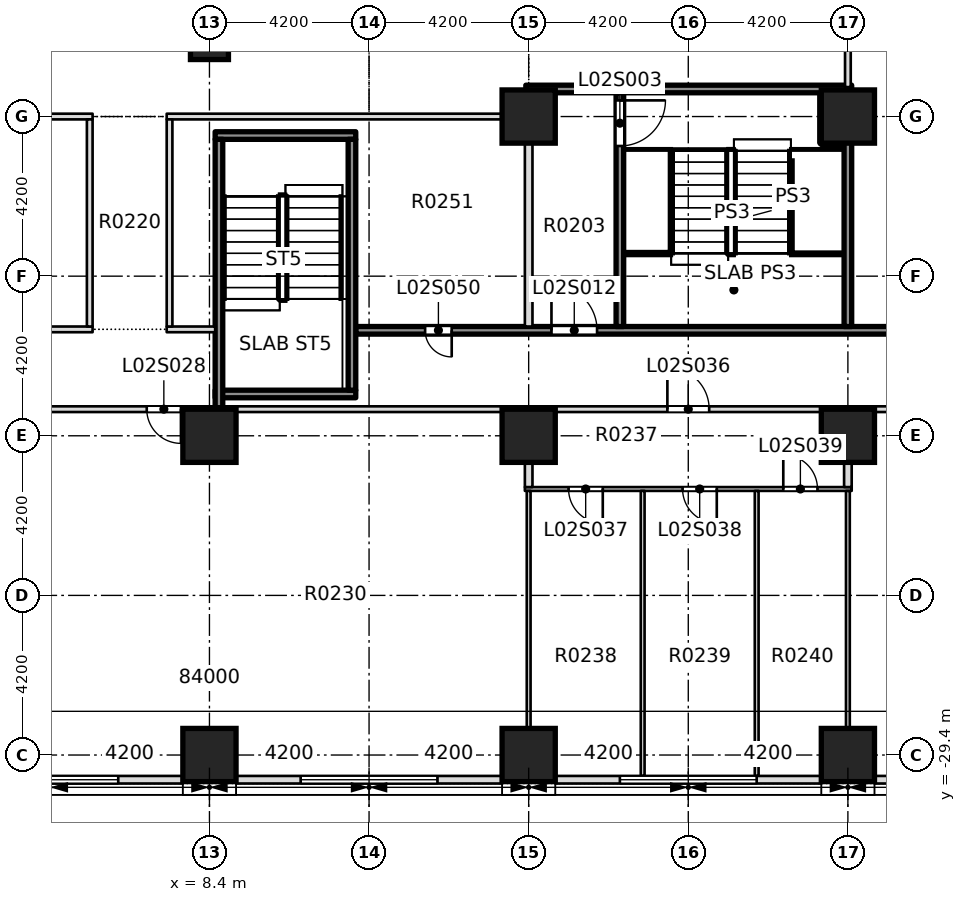
"""IFC4 building model, lengths in metres.
Left out: names, types, materials, properties, quantities, classifications, styles, units other than length and angle.
Written with IfcOpenShell. Run it as: python <this file> out.ifc"""

import sys

from ifc_helpers import new_model, si_unit, direction, frame, frame_2d, origin, origin_2d, place, context, subcontext, project, spatial, rectangle, extrude, element, fill, save


model = new_model("IFC4")
c1 = context("Model", 3, precision=1e-05, world=origin(), true_north=direction((0.0, 1.0)))
c2 = subcontext(c1, "Body", "Model", "MODEL_VIEW")
j1 = project(units=[si_unit("LENGTHUNIT", "METRE"), si_unit("PLANEANGLEUNIT", "RADIAN")], contexts=[c1])
p1 = place(None, origin())
s1 = spatial("IfcSite", under=j1, at=p1, CompositionType="ELEMENT")
p2 = place(p1, origin())
s2 = spatial("IfcBuilding", under=s1, at=p2, CompositionType="ELEMENT")
p3 = place(p2, frame((0.0, 0.0, 12.5)))
s3 = spatial("IfcBuildingStorey", under=s2, at=p3, CompositionType="ELEMENT", Elevation=12.5)
for number, where, z_axis, x_axis in (
    (1, (8.4, -21.0, -0.4), (0.0, 0.0, 1.0), (1.0, 0.0, 0.0)),
    (2, (16.8, -21.0, -0.4), (0.0, 0.0, 1.0), (1.0, 0.0, 0.0)),
    (3, (16.8, -12.6, -0.4), (0.0, 0.0, 1.0), (1.0, 0.0, 0.0)),
    (4, (25.2, -12.6, -0.4), (0.0, 0.0, 1.0), (1.0, 0.0, 0.0)),
):
    element("IfcColumn", number, at=place(p3, frame(where, z_axis=z_axis, x_axis=x_axis)), inside=s3, PredefinedType="COLUMN", context=c2, shape_type="SweptSolid", body=[
        extrude(rectangle(XDim=1.4, YDim=1.4, at=origin_2d()), origin(), (0.0, 0.0, 1.0), 7.5),
    ])
p4 = place(p3, frame((8.4, -10.6, -0.4), z_axis=(0.0, 0.0, 1.0), x_axis=(1.0, 0.0, 0.0)))
e5 = element("IfcColumn", 5, at=p4, inside=s3, PredefinedType="COLUMN", context=c2, shape_type="SweptSolid", body=[
    extrude(rectangle(XDim=1.0, YDim=1.0, at=origin_2d()), origin(), (0.0, 0.0, 1.0), 7.5),
])
for number, where, z_axis, x_axis in (
    (6, (8.4, -29.4, 0.0), (0.0, 0.0, 1.0), (1.0, 0.0, 0.0)),
    (7, (16.8, -29.4, 0.0), (0.0, 0.0, 1.0), (1.0, 0.0, 0.0)),
    (8, (25.2, -29.4, 0.0), (0.0, 0.0, 1.0), (1.0, 0.0, 0.0)),
    (9, (25.2, -21.0, 0.0), (0.0, 0.0, 1.0), (1.0, 0.0, 0.0)),
):
    element("IfcColumn", number, at=place(p3, frame(where, z_axis=z_axis, x_axis=x_axis)), inside=s3, PredefinedType="COLUMN", context=c2, shape_type="SweptSolid", body=[
        extrude(rectangle(XDim=1.4, YDim=1.4, at=origin_2d()), origin(), (0.0, 0.0, 1.0), 7.5),
    ])
p5 = place(p3, frame((16.7, -22.4, 0.0), z_axis=(0.0, 0.0, 1.0), x_axis=(1.0, 0.0, 0.0)))
e10 = element("IfcWall", 10, at=p5, inside=s3, PredefinedType="PARTITIONING", context=c2, shape_type="SweptSolid", body=[
    extrude(rectangle(XDim=8.6, YDim=0.1, at=frame_2d((4.3, 0.0))), origin(), (0.0, 0.0, 1.0), 7.1),
])
p6 = place(p5, frame((1.15, 0.0, 0.0)))
e11 = element("IfcOpeningElement", 11, at=p6, cuts=e10, PredefinedType="OPENING", context=c2, shape_type="SweptSolid", body=[
    extrude(rectangle(XDim=0.9, YDim=2.1, at=frame_2d((0.45, 1.05))), frame((0.0, 0.06, 0.0), z_axis=(0.0, -1.0, 0.0), x_axis=(1.0, 0.0, 0.0)), (0.0, 0.0, 1.0), 0.12),
])
p7 = place(p5, frame((4.15, 0.0, 0.0)))
e12 = element("IfcOpeningElement", 12, at=p7, cuts=e10, PredefinedType="OPENING", context=c2, shape_type="SweptSolid", body=[
    extrude(rectangle(XDim=0.9, YDim=2.1, at=frame_2d((0.45, 1.05))), frame((0.0, 0.06, 0.0), z_axis=(0.0, -1.0, 0.0), x_axis=(1.0, 0.0, 0.0)), (0.0, 0.0, 1.0), 0.12),
])
p8 = place(p5, frame((6.8, 0.0, 0.0)))
e13 = element("IfcOpeningElement", 13, at=p8, cuts=e10, PredefinedType="OPENING", context=c2, shape_type="SweptSolid", body=[
    extrude(rectangle(XDim=0.9, YDim=2.1, at=frame_2d((0.45, 1.05))), frame((0.0, 0.06, 0.0), z_axis=(0.0, -1.0, 0.0), x_axis=(1.0, 0.0, 0.0)), (0.0, 0.0, 1.0), 0.12),
])
p9 = place(p3, frame((-25.2, -20.3, 0.0), z_axis=(0.0, 0.0, 1.0), x_axis=(1.0, 0.0, 0.0)))
e14 = element("IfcWall", 14, at=p9, inside=s3, PredefinedType="PARTITIONING", context=c2, shape_type="SweptSolid", body=[
    extrude(rectangle(XDim=58.875, YDim=0.15, at=frame_2d((29.438, 0.0))), origin(), (0.0, 0.0, 1.0), 7.1),
])
p10 = place(p9, frame((3.65, 0.0, 0.0)))
e15 = element("IfcOpeningElement", 15, at=p10, cuts=e14, PredefinedType="OPENING", context=c2, shape_type="SweptSolid", body=[
    extrude(rectangle(XDim=1.1, YDim=2.1, at=frame_2d((0.55, 1.05))), frame((0.0, 0.085, 0.0), z_axis=(0.0, -1.0, 0.0), x_axis=(1.0, 0.0, 0.0)), (0.0, 0.0, 1.0), 0.17),
])
p11 = place(p9, frame((11.5, 0.0, 0.0)))
e16 = element("IfcOpeningElement", 16, at=p11, cuts=e14, PredefinedType="OPENING", context=c2, shape_type="SweptSolid", body=[
    extrude(rectangle(XDim=1.2, YDim=2.1, at=frame_2d((0.6, 1.05))), frame((0.0, 0.085, 0.0), z_axis=(0.0, -1.0, 0.0), x_axis=(1.0, 0.0, 0.0)), (0.0, 0.0, 1.0), 0.17),
])
p12 = place(p9, frame((20.55, 0.0, 0.0)))
e17 = element("IfcOpeningElement", 17, at=p12, cuts=e14, PredefinedType="OPENING", context=c2, shape_type="SweptSolid", body=[
    extrude(rectangle(XDim=0.9, YDim=2.1, at=frame_2d((0.45, 1.05))), frame((0.0, 0.085, 0.0), z_axis=(0.0, -1.0, 0.0), x_axis=(1.0, 0.0, 0.0)), (0.0, 0.0, 1.0), 0.17),
])
p13 = place(p9, frame((31.95, 0.0, 0.0)))
e18 = element("IfcOpeningElement", 18, at=p13, cuts=e14, PredefinedType="OPENING", context=c2, shape_type="SweptSolid", body=[
    extrude(rectangle(XDim=0.9, YDim=2.1, at=frame_2d((0.45, 1.05))), frame((0.0, 0.085, 0.0), z_axis=(0.0, -1.0, 0.0), x_axis=(1.0, 0.0, 0.0)), (0.0, 0.0, 1.0), 0.17),
])
p14 = place(p9, frame((45.65, 0.0, 0.0)))
e19 = element("IfcOpeningElement", 19, at=p14, cuts=e14, PredefinedType="OPENING", context=c2, shape_type="SweptSolid", body=[
    extrude(rectangle(XDim=1.1, YDim=2.1, at=frame_2d((0.55, 1.05))), frame((0.0, 0.085, 0.0), z_axis=(0.0, -1.0, 0.0), x_axis=(1.0, 0.0, 0.0)), (0.0, 0.0, 1.0), 0.17),
])
p15 = place(p9, frame((54.15, 0.0, 0.0)))
e20 = element("IfcOpeningElement", 20, at=p15, cuts=e14, PredefinedType="OPENING", context=c2, shape_type="SweptSolid", body=[
    extrude(rectangle(XDim=0.9, YDim=2.1, at=frame_2d((0.45, 1.05))), frame((0.0, 0.085, 0.0), z_axis=(0.0, -1.0, 0.0), x_axis=(1.0, 0.0, 0.0)), (0.0, 0.0, 1.0), 0.17),
])
p16 = place(p3, frame((1.85, -18.2, 0.0), z_axis=(0.0, 0.0, 1.0), x_axis=(1.0, 0.0, 0.0)))
e21 = element("IfcWall", 21, at=p16, inside=s3, PredefinedType="PARTITIONING", context=c2, shape_type="SweptSolid", body=[
    extrude(rectangle(XDim=3.475, YDim=0.15, at=frame_2d((1.737, 0.0))), origin(), (0.0, 0.0, 1.0), 7.1),
])
p17 = place(p3, frame((7.275, -18.2, 0.0), z_axis=(0.0, 0.0, 1.0), x_axis=(1.0, 0.0, 0.0)))
e22 = element("IfcWall", 22, at=p17, inside=s3, PredefinedType="PARTITIONING", context=c2, shape_type="SweptSolid", body=[
    extrude(rectangle(XDim=1.275, YDim=0.15, at=frame_2d((0.638, 0.0))), origin(), (0.0, 0.0, 1.0), 7.1),
])
p18 = place(p3, frame((12.25, -18.225, 0.0), z_axis=(0.0, 0.0, 1.0), x_axis=(1.0, 0.0, 0.0)))
e23 = element("IfcWall", 23, at=p18, inside=s3, PredefinedType="SOLIDWALL", context=c2, shape_type="SweptSolid", body=[
    extrude(rectangle(XDim=24.0, YDim=0.2, at=frame_2d((12.0, 0.0))), origin(), (0.0, 0.0, 1.0), 7.1),
])
p19 = place(p18, frame((5.15, 0.0, 0.0)))
e24 = element("IfcOpeningElement", 24, at=p19, cuts=e23, PredefinedType="OPENING", context=c2, shape_type="SweptSolid", body=[
    extrude(rectangle(XDim=1.2, YDim=2.1, at=frame_2d((0.6, 1.05))), frame((0.0, 0.11, 0.0), z_axis=(0.0, -1.0, 0.0), x_axis=(1.0, 0.0, 0.0)), (0.0, 0.0, 1.0), 0.22),
])
p20 = place(p18, frame((1.825, 0.0, 0.0)))
e25 = element("IfcOpeningElement", 25, at=p20, cuts=e23, PredefinedType="OPENING", context=c2, shape_type="SweptSolid", body=[
    extrude(rectangle(XDim=0.7, YDim=2.1, at=frame_2d((0.35, 1.05))), frame((0.0, 0.11, 0.0), z_axis=(0.0, -1.0, 0.0), x_axis=(1.0, 0.0, 0.0)), (0.0, 0.0, 1.0), 0.22),
])
p21 = place(p3, frame((-5.325, -12.6, 0.0), z_axis=(0.0, 0.0, 1.0), x_axis=(1.0, 0.0, 0.0)))
e26 = element("IfcWall", 26, at=p21, inside=s3, PredefinedType="PARTITIONING", context=c2, shape_type="SweptSolid", body=[
    extrude(rectangle(XDim=10.65, YDim=0.15, at=frame_2d((5.325, 0.0))), origin(), (0.0, 0.0, 1.0), 7.1),
])
p22 = place(p3, frame((7.275, -12.6, 0.0), z_axis=(0.0, 0.0, 1.0), x_axis=(1.0, 0.0, 0.0)))
e27 = element("IfcWall", 27, at=p22, inside=s3, PredefinedType="PARTITIONING", context=c2, shape_type="SweptSolid", body=[
    extrude(rectangle(XDim=9.625, YDim=0.15, at=frame_2d((4.812, 0.0))), origin(), (0.0, 0.0, 1.0), 7.1),
])
p23 = place(p3, frame((16.725, -11.875, 0.0), z_axis=(0.0, 0.0, 1.0), x_axis=(1.0, 0.0, 0.0)))
e28 = element("IfcWall", 28, at=p23, inside=s3, PredefinedType="SOLIDWALL", context=c2, shape_type="SweptSolid", body=[
    extrude(rectangle(XDim=8.575, YDim=0.2, at=frame_2d((4.288, 0.0))), origin(), (0.0, 0.0, 1.0), 7.1),
])
for number, where, z_axis, x_axis in (
    (29, (5.25, -18.125, 0.0), (0.0, 0.0, 1.0), (0.0, 1.0, 0.0)),
    (30, (7.35, -18.125, 0.0), (0.0, 0.0, 1.0), (0.0, 1.0, 0.0)),
):
    element("IfcWall", number, at=place(p3, frame(where, z_axis=z_axis, x_axis=x_axis)), inside=s3, PredefinedType="PARTITIONING", context=c2, shape_type="SweptSolid", body=[
        extrude(rectangle(XDim=5.45, YDim=0.15, at=frame_2d((2.725, 0.0))), origin(), (0.0, 0.0, 1.0), 7.1),
    ])
p24 = place(p3, frame((16.8, -29.95, 0.0), z_axis=(0.0, 0.0, 1.0), x_axis=(0.0, 1.0, 0.0)))
e31 = element("IfcWall", 31, at=p24, inside=s3, PredefinedType="PARTITIONING", context=c2, shape_type="SweptSolid", body=[
    extrude(rectangle(XDim=7.5, YDim=0.1, at=frame_2d((3.75, 0.0))), origin(), (0.0, 0.0, 1.0), 7.1),
])
p25 = place(p3, frame((16.8, -22.35, 0.0), z_axis=(0.0, 0.0, 1.0), x_axis=(0.0, 1.0, 0.0)))
e32 = element("IfcWall", 32, at=p25, inside=s3, PredefinedType="PARTITIONING", context=c2, shape_type="SweptSolid", body=[
    extrude(rectangle(XDim=1.975, YDim=0.2, at=frame_2d((0.988, 0.0))), origin(), (0.0, 0.0, 1.0), 7.1),
])
p26 = place(p3, frame((16.8, -18.125, 0.0), z_axis=(0.0, 0.0, 1.0), x_axis=(0.0, 1.0, 0.0)))
e33 = element("IfcWall", 33, at=p26, inside=s3, PredefinedType="PARTITIONING", context=c2, shape_type="SweptSolid", body=[
    extrude(rectangle(XDim=5.45, YDim=0.2, at=frame_2d((2.725, 0.0))), origin(), (0.0, 0.0, 1.0), 7.1),
])
p27 = place(p3, frame((16.8, -12.525, 0.0), z_axis=(0.0, 0.0, 1.0), x_axis=(0.0, 1.0, 0.0)))
e34 = element("IfcWall", 34, at=p27, inside=s3, PredefinedType="PARTITIONING", context=c2, shape_type="SweptSolid", body=[
    extrude(rectangle(XDim=0.55, YDim=0.15, at=frame_2d((0.275, 0.0))), origin(), (0.0, 0.0, 1.0), 7.1),
])
p28 = place(p3, frame((19.2, -18.125, 0.0), z_axis=(0.0, 0.0, 1.0), x_axis=(0.0, 1.0, 0.0)))
e35 = element("IfcWall", 35, at=p28, inside=s3, PredefinedType="SOLIDWALL", context=c2, shape_type="SweptSolid", body=[
    extrude(rectangle(XDim=6.15, YDim=0.2, at=frame_2d((3.075, 0.0))), origin(), (0.0, 0.0, 1.0), 7.1),
])
p29 = place(p28, frame((4.75, 0.0, 0.0)))
e36 = element("IfcOpeningElement", 36, at=p29, cuts=e35, PredefinedType="OPENING", context=c2, shape_type="SweptSolid", body=[
    extrude(rectangle(XDim=1.2, YDim=2.1, at=frame_2d((0.6, 1.05))), frame((0.0, 0.11, 0.0), z_axis=(0.0, -1.0, 0.0), x_axis=(1.0, 0.0, 0.0)), (0.0, 0.0, 1.0), 0.22),
])
for number, where, z_axis, x_axis in (
    (37, (19.8, -29.95, 0.0), (0.0, 0.0, 1.0), (0.0, 1.0, 0.0)),
    (38, (22.8, -29.95, 0.0), (0.0, 0.0, 1.0), (0.0, 1.0, 0.0)),
    (39, (25.2, -29.95, 0.0), (0.0, 0.0, 1.0), (0.0, 1.0, 0.0)),
):
    element("IfcWall", number, at=place(p3, frame(where, z_axis=z_axis, x_axis=x_axis)), inside=s3, PredefinedType="PARTITIONING", context=c2, shape_type="SweptSolid", body=[
        extrude(rectangle(XDim=7.5, YDim=0.1, at=frame_2d((3.75, 0.0))), origin(), (0.0, 0.0, 1.0), 7.1),
    ])
p30 = place(p3, frame((25.2, -22.35, 0.0), z_axis=(0.0, 0.0, 1.0), x_axis=(0.0, 1.0, 0.0)))
e40 = element("IfcWall", 40, at=p30, inside=s3, PredefinedType="PARTITIONING", context=c2, shape_type="SweptSolid", body=[
    extrude(rectangle(XDim=1.975, YDim=0.2, at=frame_2d((0.988, 0.0))), origin(), (0.0, 0.0, 1.0), 7.1),
])
p31 = place(p3, frame((25.2, -18.125, 0.0), z_axis=(0.0, 0.0, 1.0), x_axis=(0.0, 1.0, 0.0)))
e41 = element("IfcWall", 41, at=p31, inside=s3, PredefinedType="SOLIDWALL", context=c2, shape_type="SweptSolid", body=[
    extrude(rectangle(XDim=6.15, YDim=0.2, at=frame_2d((3.075, 0.0))), origin(), (0.0, 0.0, 1.0), 7.1),
])
p32 = place(p3, frame((25.2, -11.825, 0.0), z_axis=(0.0, 0.0, 1.0), x_axis=(0.0, 1.0, 0.0)))
e42 = element("IfcWall", 42, at=p32, inside=s3, PredefinedType="PARTITIONING", context=c2, shape_type="SweptSolid", body=[
    extrude(rectangle(XDim=24.325, YDim=0.15, at=frame_2d((12.163, 0.0))), origin(), (0.0, 0.0, 1.0), 7.1),
])
p33 = place(p32, frame((10.962, 0.0, 0.0)))
e43 = element("IfcOpeningElement", 43, at=p33, cuts=e42, PredefinedType="OPENING", context=c2, shape_type="SweptSolid", body=[
    extrude(rectangle(XDim=2.4, YDim=2.1, at=frame_2d((1.2, 1.05))), frame((0.0, 0.085, 0.0), z_axis=(0.0, -1.0, 0.0), x_axis=(1.0, 0.0, 0.0)), (0.0, 0.0, 1.0), 0.17),
])
p34 = place(p3, frame((0.7, -30.05, 0.0), z_axis=(0.0, 0.0, 1.0), x_axis=(1.0, 0.0, 0.0)))
e44 = element("IfcWall", 44, at=p34, inside=s3, PredefinedType="STANDARD", context=c2, shape_type="SweptSolid", body=[
    extrude(rectangle(XDim=7.0, YDim=0.2, at=frame_2d((3.5, 0.0))), origin(), (0.0, 0.0, 1.0), 7.1),
])
p35 = place(p34, frame((1.7, 0.0, 0.9)))
e45 = element("IfcOpeningElement", 45, at=p35, cuts=e44, PredefinedType="OPENING", context=c2, shape_type="SweptSolid", body=[
    extrude(rectangle(XDim=3.6, YDim=4.2, at=frame_2d((1.8, 2.1))), frame((0.0, 0.11, 0.0), z_axis=(0.0, -1.0, 0.0), x_axis=(1.0, 0.0, 0.0)), (0.0, 0.0, 1.0), 0.22),
])
p36 = place(p3, frame((9.1, -30.05, 0.0), z_axis=(0.0, 0.0, 1.0), x_axis=(1.0, 0.0, 0.0)))
e46 = element("IfcWall", 46, at=p36, inside=s3, PredefinedType="STANDARD", context=c2, shape_type="SweptSolid", body=[
    extrude(rectangle(XDim=7.0, YDim=0.2, at=frame_2d((3.5, 0.0))), origin(), (0.0, 0.0, 1.0), 7.1),
])
p37 = place(p36, frame((1.7, 0.0, 0.9)))
e47 = element("IfcOpeningElement", 47, at=p37, cuts=e46, PredefinedType="OPENING", context=c2, shape_type="SweptSolid", body=[
    extrude(rectangle(XDim=3.6, YDim=4.2, at=frame_2d((1.8, 2.1))), frame((0.0, 0.11, 0.0), z_axis=(0.0, -1.0, 0.0), x_axis=(1.0, 0.0, 0.0)), (0.0, 0.0, 1.0), 0.22),
])
p38 = place(p3, frame((17.5, -30.05, 0.0), z_axis=(0.0, 0.0, 1.0), x_axis=(1.0, 0.0, 0.0)))
e48 = element("IfcWall", 48, at=p38, inside=s3, PredefinedType="STANDARD", context=c2, shape_type="SweptSolid", body=[
    extrude(rectangle(XDim=7.0, YDim=0.2, at=frame_2d((3.5, 0.0))), origin(), (0.0, 0.0, 1.0), 7.1),
])
p39 = place(p38, frame((1.7, 0.0, 0.9)))
e49 = element("IfcOpeningElement", 49, at=p39, cuts=e48, PredefinedType="OPENING", context=c2, shape_type="SweptSolid", body=[
    extrude(rectangle(XDim=3.6, YDim=4.2, at=frame_2d((1.8, 2.1))), frame((0.0, 0.11, 0.0), z_axis=(0.0, -1.0, 0.0), x_axis=(1.0, 0.0, 0.0)), (0.0, 0.0, 1.0), 0.22),
])
p40 = place(p3, frame((25.9, -30.05, 0.0), z_axis=(0.0, 0.0, 1.0), x_axis=(1.0, 0.0, 0.0)))
e50 = element("IfcWall", 50, at=p40, inside=s3, PredefinedType="STANDARD", context=c2, shape_type="SweptSolid", body=[
    extrude(rectangle(XDim=23.8, YDim=0.2, at=frame_2d((11.9, 0.0))), origin(), (0.0, 0.0, 1.0), 7.1),
])
p41 = place(p40, frame((10.1, 0.0, 0.9)))
e51 = element("IfcOpeningElement", 51, at=p41, cuts=e50, PredefinedType="OPENING", context=c2, shape_type="SweptSolid", body=[
    extrude(rectangle(XDim=3.6, YDim=4.2, at=frame_2d((1.8, 2.1))), frame((0.0, 0.11, 0.0), z_axis=(0.0, -1.0, 0.0), x_axis=(1.0, 0.0, 0.0)), (0.0, 0.0, 1.0), 0.22),
])
for number, where, z_axis, x_axis in (
    (52, (8.55, -19.9, 0.0), (0.0, 0.0, 1.0), (1.0, 0.0, 0.0)),
    (53, (8.55, -13.1, 0.0), (0.0, 0.0, 1.0), (1.0, 0.0, 0.0)),
):
    element("IfcWall", number, at=place(p3, frame(where, z_axis=z_axis, x_axis=x_axis)), inside=s3, PredefinedType="SOLIDWALL", context=c2, shape_type="SweptSolid", body=[
        extrude(rectangle(XDim=3.7, YDim=0.2, at=frame_2d((1.85, 0.0))), origin(), (0.0, 0.0, 1.0), 7.1),
    ])
p42 = place(p3, frame((8.65, -20.3, 0.0), z_axis=(0.0, 0.0, 1.0), x_axis=(0.0, 1.0, 0.0)))
e54 = element("IfcWall", 54, at=p42, inside=s3, PredefinedType="SOLIDWALL", context=c2, shape_type="SweptSolid", body=[
    extrude(rectangle(XDim=7.1, YDim=0.2, at=frame_2d((3.55, 0.0))), origin(), (0.0, 0.0, 1.0), 7.1),
])
p43 = place(p3, frame((12.15, -19.8, 0.0), z_axis=(0.0, 0.0, 1.0), x_axis=(0.0, 1.0, 0.0)))
e55 = element("IfcWall", 55, at=p43, inside=s3, PredefinedType="SOLIDWALL", context=c2, shape_type="SweptSolid", body=[
    extrude(rectangle(XDim=6.6, YDim=0.2, at=frame_2d((3.3, 0.0))), origin(), (0.0, 0.0, 1.0), 7.1),
])
p44 = place(p29, origin())
e56 = element("IfcDoor", 56, at=p44, inside=s3, OperationType="DOUBLE_DOOR_SINGLE_SWING", PredefinedType="DOOR", context=c2, shape_type="SweptSolid", body=[
    extrude(rectangle(XDim=1.2, YDim=2.1, at=frame_2d((0.6, 1.05))), frame((0.0, 0.025, 0.0), z_axis=(0.0, -1.0, 0.0), x_axis=(1.0, 0.0, 0.0)), (0.0, 0.0, 1.0), 0.05),
])
fill(e36, e56)
p45 = place(p19, origin())
e57 = element("IfcDoor", 57, at=p45, inside=s3, OperationType="SINGLE_SWING_LEFT", PredefinedType="DOOR", context=c2, shape_type="SweptSolid", body=[
    extrude(rectangle(XDim=1.2, YDim=2.1, at=frame_2d((0.6, 1.05))), frame((0.0, 0.025, 0.0), z_axis=(0.0, -1.0, 0.0), x_axis=(1.0, 0.0, 0.0)), (0.0, 0.0, 1.0), 0.05),
])
fill(e24, e57)
p46 = place(p13, origin())
e58 = element("IfcDoor", 58, at=p46, inside=s3, OperationType="SINGLE_SWING_LEFT", PredefinedType="DOOR", context=c2, shape_type="SweptSolid", body=[
    extrude(rectangle(XDim=0.9, YDim=2.1, at=frame_2d((0.45, 1.05))), frame((0.0, 0.025, 0.0), z_axis=(0.0, -1.0, 0.0), x_axis=(1.0, 0.0, 0.0)), (0.0, 0.0, 1.0), 0.05),
])
fill(e18, e58)
p47 = place(p14, origin())
e59 = element("IfcDoor", 59, at=p47, inside=s3, OperationType="SINGLE_SWING_RIGHT", PredefinedType="DOOR", context=c2, shape_type="SweptSolid", body=[
    extrude(rectangle(XDim=1.1, YDim=2.1, at=frame_2d((0.55, 1.05))), frame((0.0, 0.025, 0.0), z_axis=(0.0, -1.0, 0.0), x_axis=(1.0, 0.0, 0.0)), (0.0, 0.0, 1.0), 0.05),
])
fill(e19, e59)
p48 = place(p6, origin())
e60 = element("IfcDoor", 60, at=p48, inside=s3, OperationType="SINGLE_SWING_RIGHT", PredefinedType="DOOR", context=c2, shape_type="SweptSolid", body=[
    extrude(rectangle(XDim=0.9, YDim=2.1, at=frame_2d((0.45, 1.05))), frame((0.0, 0.025, 0.0), z_axis=(0.0, -1.0, 0.0), x_axis=(1.0, 0.0, 0.0)), (0.0, 0.0, 1.0), 0.05),
])
fill(e11, e60)
p49 = place(p7, origin())
e61 = element("IfcDoor", 61, at=p49, inside=s3, OperationType="SINGLE_SWING_RIGHT", PredefinedType="DOOR", context=c2, shape_type="SweptSolid", body=[
    extrude(rectangle(XDim=0.9, YDim=2.1, at=frame_2d((0.45, 1.05))), frame((0.0, 0.025, 0.0), z_axis=(0.0, -1.0, 0.0), x_axis=(1.0, 0.0, 0.0)), (0.0, 0.0, 1.0), 0.05),
])
fill(e12, e61)
p50 = place(p8, origin())
e62 = element("IfcDoor", 62, at=p50, inside=s3, OperationType="SINGLE_SWING_RIGHT", PredefinedType="DOOR", context=c2, shape_type="SweptSolid", body=[
    extrude(rectangle(XDim=0.9, YDim=2.1, at=frame_2d((0.45, 1.05))), frame((0.0, 0.025, 0.0), z_axis=(0.0, -1.0, 0.0), x_axis=(1.0, 0.0, 0.0)), (0.0, 0.0, 1.0), 0.05),
])
fill(e13, e62)
p51 = place(p20, origin())
e63 = element("IfcDoor", 63, at=p51, inside=s3, OperationType="SINGLE_SWING_LEFT", PredefinedType="DOOR", context=c2, shape_type="SweptSolid", body=[
    extrude(rectangle(XDim=0.7, YDim=2.1, at=frame_2d((0.35, 1.05))), frame((0.0, 0.025, 0.0), z_axis=(0.0, -1.0, 0.0), x_axis=(1.0, 0.0, 0.0)), (0.0, 0.0, 1.0), 0.05),
])
fill(e25, e63)
p52 = place(p35, origin())
e64 = element("IfcWindow", 64, at=p52, inside=s3, PartitioningType="SINGLE_PANEL", PredefinedType="WINDOW", context=c2, shape_type="SweptSolid", body=[
    extrude(rectangle(XDim=3.6, YDim=4.2, at=frame_2d((1.8, 2.1))), frame((0.0, 0.03, 0.0), z_axis=(0.0, -1.0, 0.0), x_axis=(1.0, 0.0, 0.0)), (0.0, 0.0, 1.0), 0.06),
])
fill(e45, e64)
p53 = place(p37, origin())
e65 = element("IfcWindow", 65, at=p53, inside=s3, PartitioningType="SINGLE_PANEL", PredefinedType="WINDOW", context=c2, shape_type="SweptSolid", body=[
    extrude(rectangle(XDim=3.6, YDim=4.2, at=frame_2d((1.8, 2.1))), frame((0.0, 0.03, 0.0), z_axis=(0.0, -1.0, 0.0), x_axis=(1.0, 0.0, 0.0)), (0.0, 0.0, 1.0), 0.06),
])
fill(e47, e65)
p54 = place(p39, origin())
e66 = element("IfcWindow", 66, at=p54, inside=s3, PartitioningType="SINGLE_PANEL", PredefinedType="WINDOW", context=c2, shape_type="SweptSolid", body=[
    extrude(rectangle(XDim=3.6, YDim=4.2, at=frame_2d((1.8, 2.1))), frame((0.0, 0.03, 0.0), z_axis=(0.0, -1.0, 0.0), x_axis=(1.0, 0.0, 0.0)), (0.0, 0.0, 1.0), 0.06),
])
fill(e49, e66)
save(model, sys.argv[1])
